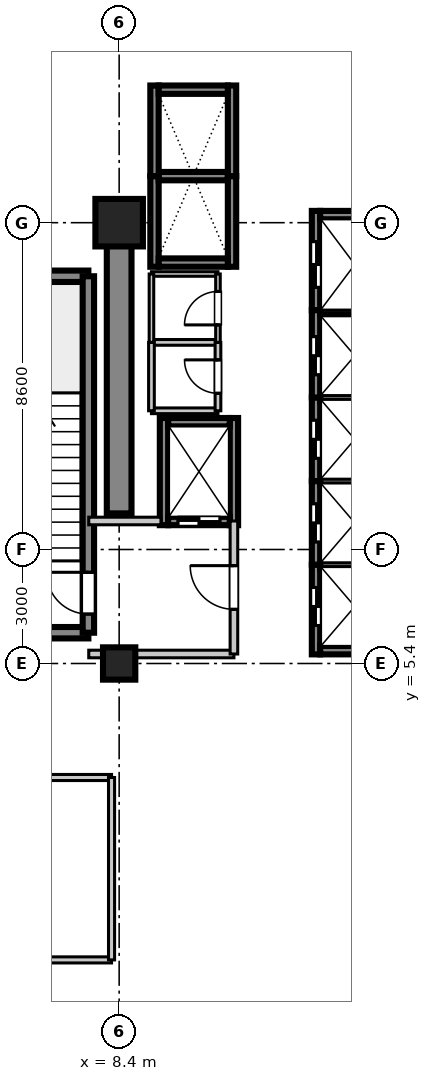
"""IFC4 building model, lengths in metres.
Left out: names, types, materials, properties, quantities, classifications, styles, units other than length and angle.
Written with IfcOpenShell. Run it as: python <this file> out.ifc"""

import sys

from ifc_helpers import new_model, si_unit, direction, frame, frame_2d, origin, origin_2d, place, context, subcontext, project, spatial, rectangle, extrude, source, transform, mapped, element, fill, save


model = new_model("IFC4")
c1 = context("Model", 3, precision=1e-05, world=origin(), true_north=direction((0.0, 1.0)))
c2 = subcontext(c1, "Body", "Model", "MODEL_VIEW")
j1 = project(units=[si_unit("LENGTHUNIT", "METRE"), si_unit("PLANEANGLEUNIT", "RADIAN")], contexts=[c1])
p1 = place(None, origin())
s1 = spatial("IfcSite", under=j1, at=p1, CompositionType="ELEMENT")
p2 = place(p1, origin())
s2 = spatial("IfcBuilding", under=s1, at=p2, CompositionType="ELEMENT")
p3 = place(p2, frame((0.0, 0.0, 139.4)))
s3 = spatial("IfcBuildingStorey", under=s2, at=p3, CompositionType="ELEMENT", Elevation=139.4)
m1 = source(origin(), c2, "Body", "SweptSolid", [
    extrude(rectangle(XDim=0.85, YDim=0.85, at=origin_2d()), origin(), (0.0, 0.0, 1.0), 4.755),
])
p4 = place(p3, frame((8.4, 5.4, 0.0), z_axis=(0.0, 0.0, 1.0), x_axis=(1.0, 0.0, 0.0)))
e1 = element("IfcColumn", 1, at=p4, inside=s3, PredefinedType="PILASTER", context=c2, shape_type="MappedRepresentation", body=[
    mapped(m1, transform((0.0, 0.0, 0.0), scale=1.0)),
])
m2 = source(origin(), c2, "Body", "SweptSolid", [
    extrude(rectangle(XDim=1.25, YDim=1.25, at=origin_2d()), origin(), (0.0, 0.0, 1.0), 4.755),
])
p5 = place(p3, frame((8.4, 17.0, 0.0), z_axis=(0.0, 0.0, 1.0), x_axis=(1.0, 0.0, 0.0)))
e2 = element("IfcColumn", 2, at=p5, inside=s3, PredefinedType="COLUMN", context=c2, shape_type="MappedRepresentation", body=[
    mapped(m2, transform((0.0, 0.0, 0.0), scale=1.0)),
])
m3 = source(origin(), c2, "Body", "SweptSolid", [
    extrude(rectangle(XDim=7.65, YDim=0.65, at=frame_2d((3.825, 0.0))), origin(), (0.0, 0.0, 1.0), 4.44),
])
p6 = place(p3, frame((8.4, 9.35, 0.0), z_axis=(0.0, 0.0, 1.0), x_axis=(0.0, 1.0, 0.0)))
e3 = element("IfcWall", 3, at=p6, inside=s3, PredefinedType="SHEAR", context=c2, shape_type="MappedRepresentation", body=[
    mapped(m3, transform((0.0, 0.0, 0.0), scale=1.0)),
])
m4 = source(origin(), c2, "Body", "SweptSolid", [
    extrude(rectangle(XDim=3.98, YDim=0.3, at=frame_2d((1.99, 0.0))), origin(), (0.0, 0.0, 1.0), 4.44),
])
for number, where, z_axis, x_axis in (
    (4, (3.61, 6.21, 0.0), (0.0, 0.0, 1.0), (1.0, 0.0, 0.0)),
    (5, (3.61, 15.59, 0.0), (0.0, 0.0, 1.0), (1.0, 0.0, 0.0)),
):
    element("IfcWall", number, at=place(p3, frame(where, z_axis=z_axis, x_axis=x_axis)), inside=s3, PredefinedType="SHEAR", context=c2, shape_type="MappedRepresentation", body=[
        mapped(m4, transform((0.0, 0.0, 0.0), scale=1.0)),
    ])
m5 = source(origin(), c2, "Body", "SweptSolid", [
    extrude(rectangle(XDim=9.38, YDim=0.3, at=frame_2d((4.69, 0.0))), origin(), (0.0, 0.0, 1.0), 4.44),
])
p7 = place(p3, frame((7.59, 6.21, 0.0), z_axis=(0.0, 0.0, 1.0), x_axis=(0.0, 1.0, 0.0)))
e6 = element("IfcWall", 6, at=p7, inside=s3, PredefinedType="SHEAR", context=c2, shape_type="MappedRepresentation", body=[
    mapped(m5, transform((0.0, 0.0, 0.0), scale=1.0)),
])
p8 = place(p7, frame((0.49, 0.0, 0.0)))
e7 = element("IfcOpeningElement", 7, at=p8, cuts=e6, PredefinedType="OPENING", context=c2, shape_type="SweptSolid", body=[
    extrude(rectangle(XDim=1.1, YDim=2.15, at=frame_2d((0.55, 1.075))), frame((0.0, 0.16, 0.0), z_axis=(0.0, -1.0, 0.0), x_axis=(1.0, 0.0, 0.0)), (0.0, 0.0, 1.0), 0.32),
])
m6 = source(origin(), c2, "Body", "SweptSolid", [
    extrude(rectangle(XDim=2.36, YDim=0.22, at=frame_2d((1.18, 0.0))), origin(), (0.0, 0.0, 1.0), 4.44),
])
p9 = place(p3, frame((13.58, 5.64, 0.0), z_axis=(0.0, 0.0, 1.0), x_axis=(0.0, 1.0, 0.0)))
e8 = element("IfcWall", 8, at=p9, inside=s3, PredefinedType="SHEAR", context=c2, shape_type="MappedRepresentation", body=[
    mapped(m6, transform((0.0, 0.0, 0.0), scale=1.0)),
])
p10 = place(p9, frame((0.76, 0.0, 0.0)))
e9 = element("IfcOpeningElement", 9, at=p10, cuts=e8, PredefinedType="OPENING", context=c2, shape_type="SweptSolid", body=[
    extrude(rectangle(XDim=1.0, YDim=2.2, at=frame_2d((0.5, 1.1))), frame((0.0, 0.12, 0.0), z_axis=(0.0, -1.0, 0.0), x_axis=(1.0, 0.0, 0.0)), (0.0, 0.0, 1.0), 0.24),
])
m7 = source(origin(), c2, "Body", "SweptSolid", [
    extrude(rectangle(XDim=1.82, YDim=0.22, at=frame_2d((0.91, 0.0))), origin(), (0.0, 0.0, 1.0), 4.44),
])
p11 = place(p3, frame((13.69, 5.75, 0.0), z_axis=(0.0, 0.0, 1.0), x_axis=(1.0, 0.0, 0.0)))
e10 = element("IfcWall", 10, at=p11, inside=s3, PredefinedType="SHEAR", context=c2, shape_type="MappedRepresentation", body=[
    mapped(m7, transform((0.0, 0.0, 0.0), scale=1.0)),
])
m8 = source(origin(), c2, "Body", "SweptSolid", [
    extrude(rectangle(XDim=1.82, YDim=0.22, at=frame_2d((0.91, 0.0))), origin(), (0.0, 0.0, 1.0), 4.8),
])
p12 = place(p3, frame((13.69, 8.0, 0.0), z_axis=(0.0, 0.0, 1.0), x_axis=(1.0, 0.0, 0.0)))
e11 = element("IfcWall", 11, at=p12, inside=s3, PredefinedType="SHEAR", context=c2, shape_type="MappedRepresentation", body=[
    mapped(m8, transform((0.0, 0.0, 0.0), scale=1.0)),
])
m9 = source(origin(), c2, "Body", "SweptSolid", [
    extrude(rectangle(XDim=2.2, YDim=0.22, at=frame_2d((1.1, 0.0))), origin(), (0.0, 0.0, 1.0), 4.44),
])
p13 = place(p3, frame((13.58, 8.0, 0.0), z_axis=(0.0, 0.0, 1.0), x_axis=(0.0, 1.0, 0.0)))
e12 = element("IfcWall", 12, at=p13, inside=s3, PredefinedType="SHEAR", context=c2, shape_type="MappedRepresentation", body=[
    mapped(m9, transform((0.0, 0.0, 0.0), scale=1.0)),
])
p14 = place(p13, frame((0.6, 0.0, 0.0)))
e13 = element("IfcOpeningElement", 13, at=p14, cuts=e12, PredefinedType="OPENING", context=c2, shape_type="SweptSolid", body=[
    extrude(rectangle(XDim=1.0, YDim=2.2, at=frame_2d((0.5, 1.1))), frame((0.0, 0.12, 0.0), z_axis=(0.0, -1.0, 0.0), x_axis=(1.0, 0.0, 0.0)), (0.0, 0.0, 1.0), 0.24),
])
p15 = place(p3, frame((13.69, 10.2, 0.0), z_axis=(0.0, 0.0, 1.0), x_axis=(1.0, 0.0, 0.0)))
e14 = element("IfcWall", 14, at=p15, inside=s3, PredefinedType="SHEAR", context=c2, shape_type="MappedRepresentation", body=[
    mapped(m8, transform((0.0, 0.0, 0.0), scale=1.0)),
])
p16 = place(p3, frame((13.58, 10.2, 0.0), z_axis=(0.0, 0.0, 1.0), x_axis=(0.0, 1.0, 0.0)))
e15 = element("IfcWall", 15, at=p16, inside=s3, PredefinedType="SHEAR", context=c2, shape_type="MappedRepresentation", body=[
    mapped(m9, transform((0.0, 0.0, 0.0), scale=1.0)),
])
p17 = place(p16, frame((0.6, 0.0, 0.0)))
e16 = element("IfcOpeningElement", 16, at=p17, cuts=e15, PredefinedType="OPENING", context=c2, shape_type="SweptSolid", body=[
    extrude(rectangle(XDim=1.0, YDim=2.2, at=frame_2d((0.5, 1.1))), frame((0.0, 0.12, 0.0), z_axis=(0.0, -1.0, 0.0), x_axis=(1.0, 0.0, 0.0)), (0.0, 0.0, 1.0), 0.24),
])
p18 = place(p3, frame((13.69, 12.4, 0.0), z_axis=(0.0, 0.0, 1.0), x_axis=(1.0, 0.0, 0.0)))
e17 = element("IfcWall", 17, at=p18, inside=s3, PredefinedType="SHEAR", context=c2, shape_type="MappedRepresentation", body=[
    mapped(m8, transform((0.0, 0.0, 0.0), scale=1.0)),
])
m10 = source(origin(), c2, "Body", "SweptSolid", [
    extrude(rectangle(XDim=2.3, YDim=0.22, at=frame_2d((1.15, 0.0))), origin(), (0.0, 0.0, 1.0), 4.44),
])
p19 = place(p3, frame((13.58, 12.4, 0.0), z_axis=(0.0, 0.0, 1.0), x_axis=(0.0, 1.0, 0.0)))
e18 = element("IfcWall", 18, at=p19, inside=s3, PredefinedType="SHEAR", context=c2, shape_type="MappedRepresentation", body=[
    mapped(m10, transform((0.0, 0.0, 0.0), scale=1.0)),
])
p20 = place(p19, frame((0.6, 0.0, 0.0)))
e19 = element("IfcOpeningElement", 19, at=p20, cuts=e18, PredefinedType="OPENING", context=c2, shape_type="SweptSolid", body=[
    extrude(rectangle(XDim=1.0, YDim=2.2, at=frame_2d((0.5, 1.1))), frame((0.0, 0.12, 0.0), z_axis=(0.0, -1.0, 0.0), x_axis=(1.0, 0.0, 0.0)), (0.0, 0.0, 1.0), 0.24),
])
p21 = place(p3, frame((13.69, 14.7, 0.0), z_axis=(0.0, 0.0, 1.0), x_axis=(1.0, 0.0, 0.0)))
e20 = element("IfcWall", 20, at=p21, inside=s3, PredefinedType="SHEAR", context=c2, shape_type="MappedRepresentation", body=[
    mapped(m8, transform((0.0, 0.0, 0.0), scale=1.0)),
])
m11 = source(origin(), c2, "Body", "SweptSolid", [
    extrude(rectangle(XDim=2.385, YDim=0.22, at=frame_2d((1.192, 0.0))), origin(), (0.0, 0.0, 1.0), 4.44),
])
for number, where, z_axis, x_axis in (
    (21, (9.33, 15.84, 0.0), (0.0, 0.0, 1.0), (0.0, 1.0, 0.0)),
    (22, (11.37, 15.84, 0.0), (0.0, 0.0, 1.0), (0.0, 1.0, 0.0)),
):
    element("IfcWall", number, at=place(p3, frame(where, z_axis=z_axis, x_axis=x_axis)), inside=s3, PredefinedType="SHEAR", context=c2, shape_type="MappedRepresentation", body=[
        mapped(m11, transform((0.0, 0.0, 0.0), scale=1.0)),
    ])
p22 = place(p3, frame((9.44, 15.95, 0.0), z_axis=(0.0, 0.0, 1.0), x_axis=(1.0, 0.0, 0.0)))
e23 = element("IfcWall", 23, at=p22, inside=s3, PredefinedType="SHEAR", context=c2, shape_type="MappedRepresentation", body=[
    mapped(m7, transform((0.0, 0.0, 0.0), scale=1.0)),
])
p23 = place(p3, frame((9.44, 18.225, 0.0), z_axis=(0.0, 0.0, 1.0), x_axis=(1.0, 0.0, 0.0)))
e24 = element("IfcWall", 24, at=p23, inside=s3, PredefinedType="SHEAR", context=c2, shape_type="MappedRepresentation", body=[
    mapped(m8, transform((0.0, 0.0, 0.0), scale=1.0)),
])
for number, where, z_axis, x_axis in (
    (25, (9.33, 18.225, 0.0), (0.0, 0.0, 1.0), (0.0, 1.0, 0.0)),
    (26, (11.37, 18.225, 0.0), (0.0, 0.0, 1.0), (0.0, 1.0, 0.0)),
):
    element("IfcWall", number, at=place(p3, frame(where, z_axis=z_axis, x_axis=x_axis)), inside=s3, PredefinedType="SHEAR", context=c2, shape_type="MappedRepresentation", body=[
        mapped(m11, transform((0.0, 0.0, 0.0), scale=1.0)),
    ])
p24 = place(p3, frame((9.44, 20.5, 0.0), z_axis=(0.0, 0.0, 1.0), x_axis=(1.0, 0.0, 0.0)))
e27 = element("IfcWall", 27, at=p24, inside=s3, PredefinedType="SHEAR", context=c2, shape_type="MappedRepresentation", body=[
    mapped(m7, transform((0.0, 0.0, 0.0), scale=1.0)),
])
m12 = source(origin(), c2, "Body", "SweptSolid", [
    extrude(rectangle(XDim=2.82, YDim=0.22, at=frame_2d((1.41, 0.0))), origin(), (0.0, 0.0, 1.0), 4.44),
])
for number, where, z_axis, x_axis in (
    (28, (9.58, 9.04, 0.0), (0.0, 0.0, 1.0), (0.0, 1.0, 0.0)),
    (29, (11.42, 9.04, 0.0), (0.0, 0.0, 1.0), (0.0, 1.0, 0.0)),
):
    element("IfcWall", number, at=place(p3, frame(where, z_axis=z_axis, x_axis=x_axis)), inside=s3, PredefinedType="SHEAR", context=c2, shape_type="MappedRepresentation", body=[
        mapped(m12, transform((0.0, 0.0, 0.0), scale=1.0)),
    ])
m13 = source(origin(), c2, "Body", "SweptSolid", [
    extrude(rectangle(XDim=1.62, YDim=0.22, at=frame_2d((0.81, 0.0))), origin(), (0.0, 0.0, 1.0), 4.44),
])
p25 = place(p3, frame((9.69, 9.15, 0.0), z_axis=(0.0, 0.0, 1.0), x_axis=(1.0, 0.0, 0.0)))
e30 = element("IfcWall", 30, at=p25, inside=s3, PredefinedType="SHEAR", context=c2, shape_type="MappedRepresentation", body=[
    mapped(m13, transform((0.0, 0.0, 0.0), scale=1.0)),
])
p26 = place(p25, frame((0.26, 0.0, 0.0)))
e31 = element("IfcOpeningElement", 31, at=p26, cuts=e30, PredefinedType="OPENING", context=c2, shape_type="SweptSolid", body=[
    extrude(rectangle(XDim=1.1, YDim=2.2, at=frame_2d((0.55, 1.1))), frame((0.0, 0.12, 0.0), z_axis=(0.0, -1.0, 0.0), x_axis=(1.0, 0.0, 0.0)), (0.0, 0.0, 1.0), 0.24),
])
p27 = place(p3, frame((9.69, 11.75, 0.0), z_axis=(0.0, 0.0, 1.0), x_axis=(1.0, 0.0, 0.0)))
e32 = element("IfcWall", 32, at=p27, inside=s3, PredefinedType="SHEAR", context=c2, shape_type="MappedRepresentation", body=[
    mapped(m13, transform((0.0, 0.0, 0.0), scale=1.0)),
])
m14 = source(origin(), c2, "Body", "SweptSolid", [
    extrude(rectangle(XDim=2.61, YDim=0.22, at=frame_2d((1.305, 0.0))), origin(), (0.0, 0.0, 1.0), 4.44),
])
p28 = place(p3, frame((13.58, 14.7, 0.0), z_axis=(0.0, 0.0, 1.0), x_axis=(0.0, 1.0, 0.0)))
e33 = element("IfcWall", 33, at=p28, inside=s3, PredefinedType="SHEAR", context=c2, shape_type="MappedRepresentation", body=[
    mapped(m14, transform((0.0, 0.0, 0.0), scale=1.0)),
])
p29 = place(p28, frame((0.6, 0.0, 0.0)))
e34 = element("IfcOpeningElement", 34, at=p29, cuts=e33, PredefinedType="OPENING", context=c2, shape_type="SweptSolid", body=[
    extrude(rectangle(XDim=1.2, YDim=2.2, at=frame_2d((0.6, 1.1))), frame((0.0, 0.12, 0.0), z_axis=(0.0, -1.0, 0.0), x_axis=(1.0, 0.0, 0.0)), (0.0, 0.0, 1.0), 0.24),
])
p30 = place(p3, frame((13.69, 17.2, 0.0), z_axis=(0.0, 0.0, 1.0), x_axis=(1.0, 0.0, 0.0)))
e35 = element("IfcWall", 35, at=p30, inside=s3, PredefinedType="SHEAR", context=c2, shape_type="MappedRepresentation", body=[
    mapped(m7, transform((0.0, 0.0, 0.0), scale=1.0)),
])
m15 = source(origin(), c2, "Body", "SweptSolid", [
    extrude(rectangle(XDim=3.82, YDim=0.2, at=frame_2d((1.91, 0.0))), origin(), (0.0, 0.0, 1.0), 3.4),
])
p31 = place(p3, frame((7.6, 5.65, 0.0), z_axis=(0.0, 0.0, 1.0), x_axis=(1.0, 0.0, 0.0)))
e36 = element("IfcWall", 36, at=p31, inside=s3, PredefinedType="PARTITIONING", context=c2, shape_type="MappedRepresentation", body=[
    mapped(m15, transform((0.0, 0.0, 0.0), scale=1.0)),
])
m16 = source(origin(), c2, "Body", "SweptSolid", [
    extrude(rectangle(XDim=1.9, YDim=0.2, at=frame_2d((0.95, 0.0))), origin(), (0.0, 0.0, 1.0), 3.4),
])
p32 = place(p3, frame((7.6, 9.15, 0.0), z_axis=(0.0, 0.0, 1.0), x_axis=(1.0, 0.0, 0.0)))
e37 = element("IfcWall", 37, at=p32, inside=s3, PredefinedType="PARTITIONING", context=c2, shape_type="MappedRepresentation", body=[
    mapped(m16, transform((0.0, 0.0, 0.0), scale=1.0)),
])
m17 = source(origin(), c2, "Body", "SweptSolid", [
    extrude(rectangle(XDim=3.5, YDim=0.2, at=frame_2d((1.75, 0.0))), origin(), (0.0, 0.0, 1.0), 3.4),
])
p33 = place(p3, frame((11.42, 5.65, 0.0), z_axis=(0.0, 0.0, 1.0), x_axis=(0.0, 1.0, 0.0)))
e38 = element("IfcWall", 38, at=p33, inside=s3, PredefinedType="PARTITIONING", context=c2, shape_type="MappedRepresentation", body=[
    mapped(m17, transform((0.0, 0.0, 0.0), scale=1.0)),
])
p34 = place(p33, frame((1.175, 0.0, 0.0)))
e39 = element("IfcOpeningElement", 39, at=p34, cuts=e38, PredefinedType="OPENING", context=c2, shape_type="SweptSolid", body=[
    extrude(rectangle(XDim=1.15, YDim=2.15, at=frame_2d((0.575, 1.075))), frame((0.0, 0.11, 0.0), z_axis=(0.0, -1.0, 0.0), x_axis=(1.0, 0.0, 0.0)), (0.0, 0.0, 1.0), 0.22),
])
m18 = source(origin(), c2, "Body", "SweptSolid", [
    extrude(rectangle(XDim=1.75, YDim=0.15, at=frame_2d((0.875, 0.0))), origin(), (0.0, 0.0, 1.0), 3.4),
])
for number, where, z_axis, x_axis in (
    (40, (9.25, 12.05, 0.0), (0.0, 0.0, 1.0), (1.0, 0.0, 0.0)),
    (41, (9.25, 13.85, 0.0), (0.0, 0.0, 1.0), (1.0, 0.0, 0.0)),
):
    element("IfcWall", number, at=place(p3, frame(where, z_axis=z_axis, x_axis=x_axis)), inside=s3, PredefinedType="PARTITIONING", context=c2, shape_type="MappedRepresentation", body=[
        mapped(m18, transform((0.0, 0.0, 0.0), scale=1.0)),
    ])
m19 = source(origin(), c2, "Body", "SweptSolid", [
    extrude(rectangle(XDim=1.8, YDim=0.15, at=frame_2d((0.9, 0.0))), origin(), (0.0, 0.0, 1.0), 3.4),
])
p35 = place(p3, frame((9.25, 12.05, 0.0), z_axis=(0.0, 0.0, 1.0), x_axis=(0.0, 1.0, 0.0)))
e42 = element("IfcWall", 42, at=p35, inside=s3, PredefinedType="PARTITIONING", context=c2, shape_type="MappedRepresentation", body=[
    mapped(m19, transform((0.0, 0.0, 0.0), scale=1.0)),
])
p36 = place(p3, frame((11.0, 12.05, 0.0), z_axis=(0.0, 0.0, 1.0), x_axis=(0.0, 1.0, 0.0)))
e43 = element("IfcWall", 43, at=p36, inside=s3, PredefinedType="PARTITIONING", context=c2, shape_type="MappedRepresentation", body=[
    mapped(m19, transform((0.0, 0.0, 0.0), scale=1.0)),
])
p37 = place(p36, frame((0.46, 0.0, 0.0)))
e44 = element("IfcOpeningElement", 44, at=p37, cuts=e43, PredefinedType="OPENING", context=c2, shape_type="SweptSolid", body=[
    extrude(rectangle(XDim=0.88, YDim=2.1, at=frame_2d((0.44, 1.05))), frame((0.0, 0.085, 0.0), z_axis=(0.0, -1.0, 0.0), x_axis=(1.0, 0.0, 0.0)), (0.0, 0.0, 1.0), 0.17),
])
m20 = source(origin(), c2, "Body", "SweptSolid", [
    extrude(rectangle(XDim=1.75, YDim=0.12, at=frame_2d((0.875, 0.0))), origin(), (0.0, 0.0, 1.0), 3.4),
])
p38 = place(p3, frame((9.25, 15.65, 0.0), z_axis=(0.0, 0.0, 1.0), x_axis=(1.0, 0.0, 0.0)))
e45 = element("IfcWall", 45, at=p38, inside=s3, PredefinedType="PARTITIONING", context=c2, shape_type="MappedRepresentation", body=[
    mapped(m20, transform((0.0, 0.0, 0.0), scale=1.0)),
])
m21 = source(origin(), c2, "Body", "SweptSolid", [
    extrude(rectangle(XDim=1.8, YDim=0.12, at=frame_2d((0.9, 0.0))), origin(), (0.0, 0.0, 1.0), 3.4),
])
p39 = place(p3, frame((9.25, 13.85, 0.0), z_axis=(0.0, 0.0, 1.0), x_axis=(0.0, 1.0, 0.0)))
e46 = element("IfcWall", 46, at=p39, inside=s3, PredefinedType="PARTITIONING", context=c2, shape_type="MappedRepresentation", body=[
    mapped(m21, transform((0.0, 0.0, 0.0), scale=1.0)),
])
p40 = place(p3, frame((11.0, 13.85, 0.0), z_axis=(0.0, 0.0, 1.0), x_axis=(0.0, 1.0, 0.0)))
e47 = element("IfcWall", 47, at=p40, inside=s3, PredefinedType="PARTITIONING", context=c2, shape_type="MappedRepresentation", body=[
    mapped(m21, transform((0.0, 0.0, 0.0), scale=1.0)),
])
p41 = place(p40, frame((0.46, 0.0, 0.0)))
e48 = element("IfcOpeningElement", 48, at=p41, cuts=e47, PredefinedType="OPENING", context=c2, shape_type="SweptSolid", body=[
    extrude(rectangle(XDim=0.88, YDim=2.1, at=frame_2d((0.44, 1.05))), frame((0.0, 0.07, 0.0), z_axis=(0.0, -1.0, 0.0), x_axis=(1.0, 0.0, 0.0)), (0.0, 0.0, 1.0), 0.14),
])
m22 = source(origin(), c2, "Body", "SweptSolid", [
    extrude(rectangle(XDim=32.0, YDim=0.16, at=frame_2d((16.0, 0.0))), origin(), (0.0, 0.0, 1.0), 3.4),
])
p42 = place(p3, frame((-23.8, -2.4, 0.0), z_axis=(0.0, 0.0, 1.0), x_axis=(1.0, 0.0, 0.0)))
e49 = element("IfcWall", 49, at=p42, inside=s3, PredefinedType="PARTITIONING", context=c2, shape_type="MappedRepresentation", body=[
    mapped(m22, transform((0.0, 0.0, 0.0), scale=1.0)),
])
p43 = place(p3, frame((-23.8, 2.4, 0.0), z_axis=(0.0, 0.0, 1.0), x_axis=(1.0, 0.0, 0.0)))
e50 = element("IfcWall", 50, at=p43, inside=s3, PredefinedType="PARTITIONING", context=c2, shape_type="MappedRepresentation", body=[
    mapped(m22, transform((0.0, 0.0, 0.0), scale=1.0)),
])
p44 = place(p43, frame((9.991, 0.0, 0.0)))
e51 = element("IfcOpeningElement", 51, at=p44, cuts=e50, PredefinedType="OPENING", context=c2, shape_type="SweptSolid", body=[
    extrude(rectangle(XDim=1.5, YDim=2.15, at=frame_2d((0.75, 1.075))), frame((0.0, 0.09, 0.0), z_axis=(0.0, -1.0, 0.0), x_axis=(1.0, 0.0, 0.0)), (0.0, 0.0, 1.0), 0.18),
])
m23 = source(origin(), c2, "Body", "SweptSolid", [
    extrude(rectangle(XDim=4.8, YDim=0.16, at=frame_2d((2.4, 0.0))), origin(), (0.0, 0.0, 1.0), 3.4),
])
p45 = place(p3, frame((8.2, -2.4, 0.0), z_axis=(0.0, 0.0, 1.0), x_axis=(0.0, 1.0, 0.0)))
e52 = element("IfcWall", 52, at=p45, inside=s3, PredefinedType="PARTITIONING", context=c2, shape_type="MappedRepresentation", body=[
    mapped(m23, transform((0.0, 0.0, 0.0), scale=1.0)),
])
m24 = source(origin(), c2, "Body", "SweptSolid", [
    extrude(rectangle(XDim=1.1, YDim=2.15, at=frame_2d((0.55, 1.075))), frame((0.0, 0.025, 0.0), z_axis=(0.0, -1.0, 0.0), x_axis=(1.0, 0.0, 0.0)), (0.0, 0.0, 1.0), 0.05),
])
p46 = place(p8, origin())
e53 = element("IfcDoor", 53, at=p46, inside=s3, OperationType="SINGLE_SWING_RIGHT", PredefinedType="DOOR", context=c2, shape_type="MappedRepresentation", body=[
    mapped(m24, transform((0.0, 0.0, 0.0), scale=1.0)),
])
fill(e7, e53)
m25 = source(origin(), c2, "Body", "SweptSolid", [
    extrude(rectangle(XDim=1.0, YDim=2.2, at=frame_2d((0.5, 1.1))), frame((0.0, 0.025, 0.0), z_axis=(0.0, -1.0, 0.0), x_axis=(1.0, 0.0, 0.0)), (0.0, 0.0, 1.0), 0.05),
])
p47 = place(p10, origin())
e54 = element("IfcDoor", 54, at=p47, inside=s3, OperationType="DOUBLE_DOOR_SLIDING", PredefinedType="DOOR", context=c2, shape_type="MappedRepresentation", body=[
    mapped(m25, transform((0.0, 0.0, 0.0), scale=1.0)),
])
fill(e9, e54)
p48 = place(p14, origin())
e55 = element("IfcDoor", 55, at=p48, inside=s3, OperationType="DOUBLE_DOOR_SLIDING", PredefinedType="DOOR", context=c2, shape_type="MappedRepresentation", body=[
    mapped(m25, transform((0.0, 0.0, 0.0), scale=1.0)),
])
fill(e13, e55)
p49 = place(p17, origin())
e56 = element("IfcDoor", 56, at=p49, inside=s3, OperationType="DOUBLE_DOOR_SLIDING", PredefinedType="DOOR", context=c2, shape_type="MappedRepresentation", body=[
    mapped(m25, transform((0.0, 0.0, 0.0), scale=1.0)),
])
fill(e16, e56)
p50 = place(p20, origin())
e57 = element("IfcDoor", 57, at=p50, inside=s3, OperationType="DOUBLE_DOOR_SLIDING", PredefinedType="DOOR", context=c2, shape_type="MappedRepresentation", body=[
    mapped(m25, transform((0.0, 0.0, 0.0), scale=1.0)),
])
fill(e19, e57)
m26 = source(origin(), c2, "Body", "SweptSolid", [
    extrude(rectangle(XDim=1.1, YDim=2.2, at=frame_2d((0.55, 1.1))), frame((0.0, 0.025, 0.0), z_axis=(0.0, -1.0, 0.0), x_axis=(1.0, 0.0, 0.0)), (0.0, 0.0, 1.0), 0.05),
])
p51 = place(p26, frame((1.1, 0.0, 0.0), z_axis=(0.0, 0.0, 1.0), x_axis=(-1.0, 0.0, 0.0)))
e58 = element("IfcDoor", 58, at=p51, inside=s3, OperationType="DOUBLE_DOOR_SLIDING", PredefinedType="DOOR", context=c2, shape_type="MappedRepresentation", body=[
    mapped(m26, transform((0.0, 0.0, 0.0), scale=1.0)),
])
fill(e31, e58)
m27 = source(origin(), c2, "Body", "SweptSolid", [
    extrude(rectangle(XDim=1.2, YDim=2.2, at=frame_2d((0.6, 1.1))), frame((0.0, 0.025, 0.0), z_axis=(0.0, -1.0, 0.0), x_axis=(1.0, 0.0, 0.0)), (0.0, 0.0, 1.0), 0.05),
])
p52 = place(p29, origin())
e59 = element("IfcDoor", 59, at=p52, inside=s3, OperationType="DOUBLE_DOOR_SLIDING", PredefinedType="DOOR", context=c2, shape_type="MappedRepresentation", body=[
    mapped(m27, transform((0.0, 0.0, 0.0), scale=1.0)),
])
fill(e34, e59)
m28 = source(origin(), c2, "Body", "SweptSolid", [
    extrude(rectangle(XDim=1.15, YDim=2.15, at=frame_2d((0.575, 1.075))), frame((0.0, 0.025, 0.0), z_axis=(0.0, -1.0, 0.0), x_axis=(1.0, 0.0, 0.0)), (0.0, 0.0, 1.0), 0.05),
])
p53 = place(p34, frame((1.15, 0.0, 0.0), z_axis=(0.0, 0.0, 1.0), x_axis=(-1.0, 0.0, 0.0)))
e60 = element("IfcDoor", 60, at=p53, inside=s3, OperationType="SINGLE_SWING_RIGHT", PredefinedType="DOOR", context=c2, shape_type="MappedRepresentation", body=[
    mapped(m28, transform((0.0, 0.0, 0.0), scale=1.0)),
])
fill(e39, e60)
m29 = source(origin(), c2, "Body", "SweptSolid", [
    extrude(rectangle(XDim=0.88, YDim=2.1, at=frame_2d((0.44, 1.05))), frame((0.0, 0.025, 0.0), z_axis=(0.0, -1.0, 0.0), x_axis=(1.0, 0.0, 0.0)), (0.0, 0.0, 1.0), 0.05),
])
p54 = place(p37, origin())
e61 = element("IfcDoor", 61, at=p54, inside=s3, OperationType="SINGLE_SWING_RIGHT", PredefinedType="DOOR", context=c2, shape_type="MappedRepresentation", body=[
    mapped(m29, transform((0.0, 0.0, 0.0), scale=1.0)),
])
fill(e44, e61)
p55 = place(p41, origin())
e62 = element("IfcDoor", 62, at=p55, inside=s3, OperationType="SINGLE_SWING_LEFT", PredefinedType="DOOR", context=c2, shape_type="MappedRepresentation", body=[
    mapped(m29, transform((0.0, 0.0, 0.0), scale=1.0)),
])
fill(e48, e62)
save(model, sys.argv[1])
